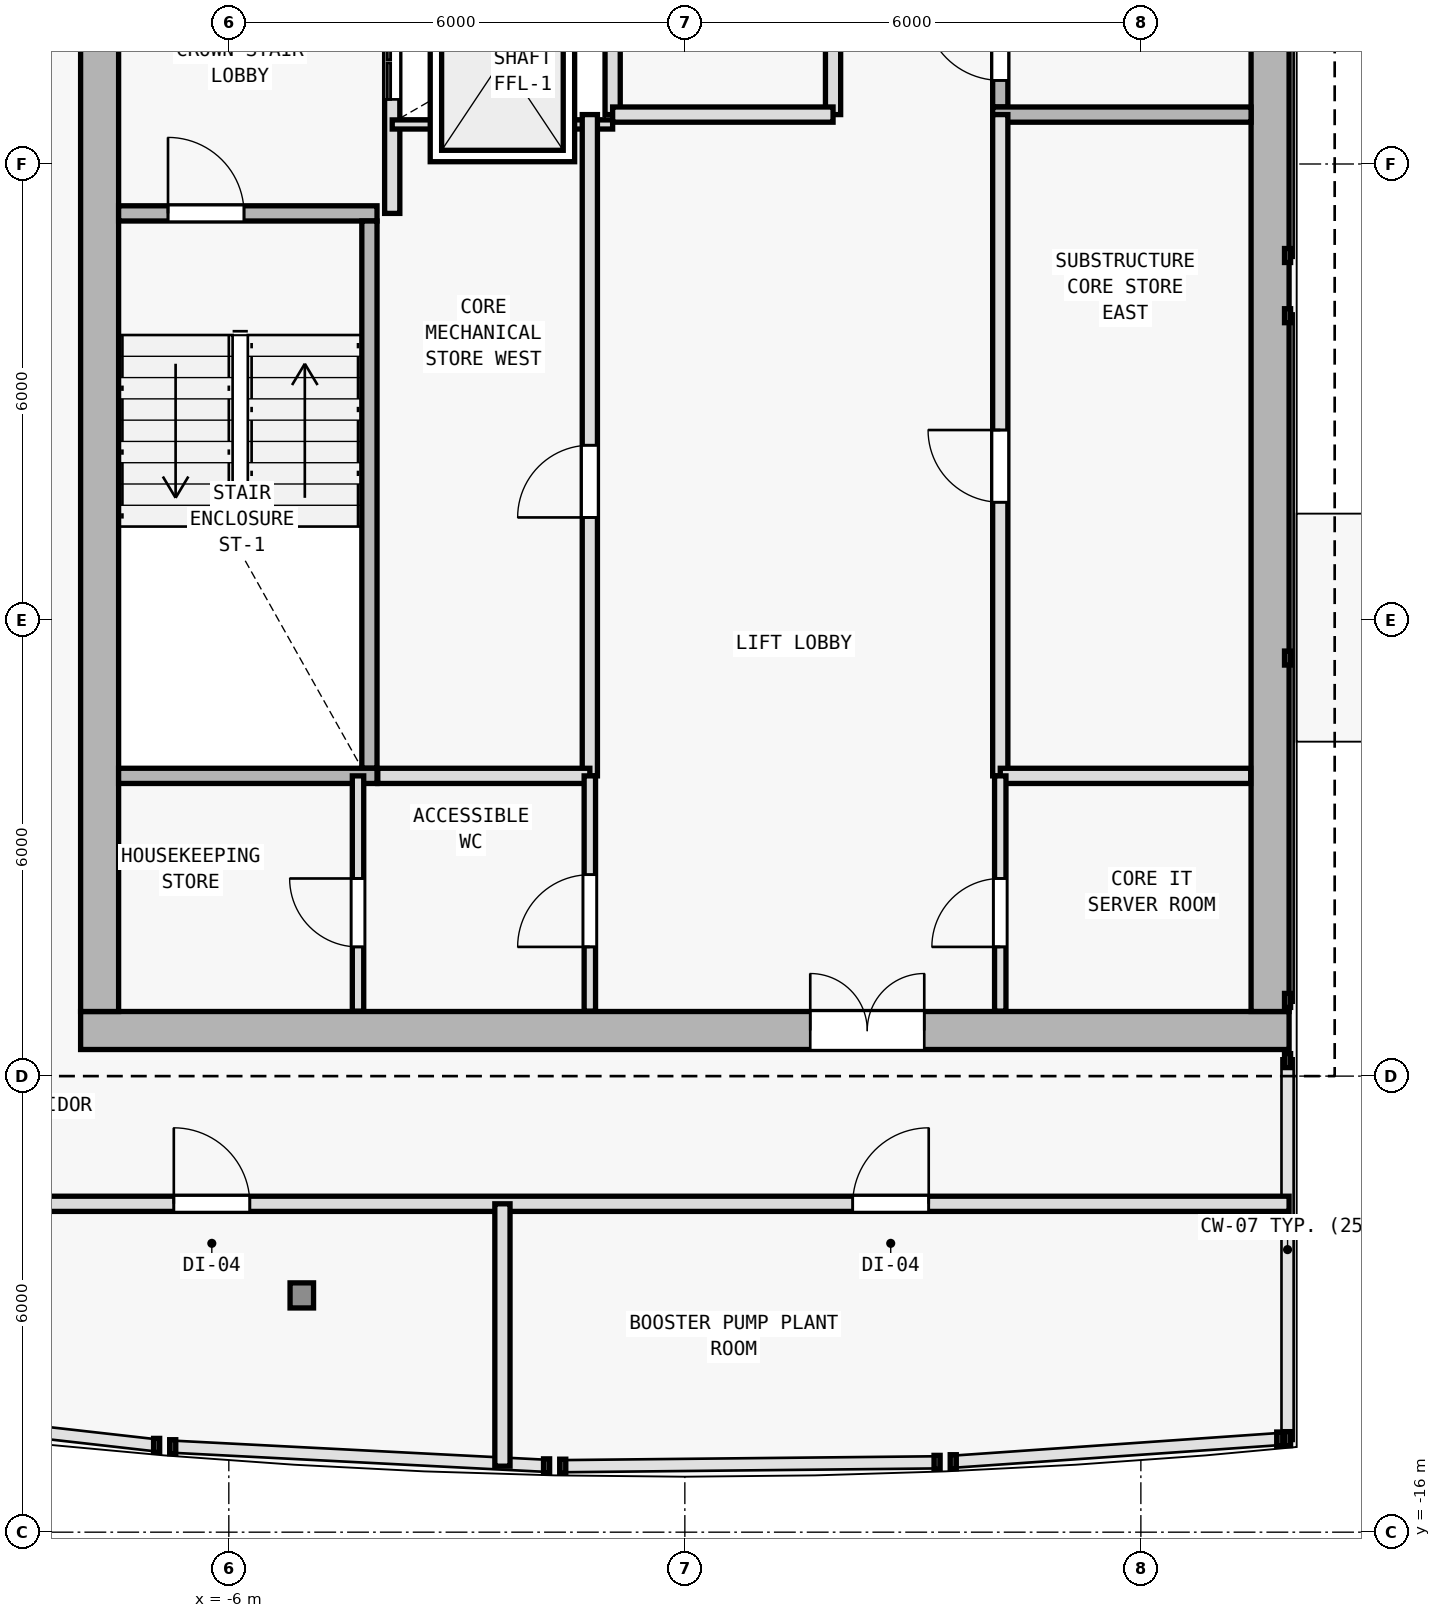
"""IFC4 building model, lengths in metres.
Left out: names, types, materials, properties, quantities, classifications, styles, units other than length and angle.
Written with IfcOpenShell. Run it as: python <this file> out.ifc"""

import sys

from ifc_helpers import new_model, si_unit, direction, frame, frame_2d, origin, origin_2d, place, context, subcontext, project, spatial, rectangle, i_section, extrude, element, fill, save


model = new_model("IFC4")
c1 = context("Model", 3, precision=1e-05, world=origin(), true_north=direction((0.0, 1.0)))
c2 = subcontext(c1, "Body", "Model", "MODEL_VIEW")
j1 = project(units=[si_unit("LENGTHUNIT", "METRE"), si_unit("PLANEANGLEUNIT", "RADIAN")], contexts=[c1])
p1 = place(None, origin())
s1 = spatial("IfcSite", under=j1, at=p1, CompositionType="ELEMENT")
p2 = place(p1, origin())
s2 = spatial("IfcBuilding", under=s1, at=p2, CompositionType="ELEMENT")
p3 = place(p2, frame((0.0, 0.0, 301.2)))
s3 = spatial("IfcBuildingStorey", under=s2, at=p3, CompositionType="ELEMENT", Elevation=301.2)
for number, where, z_axis, x_axis in (
    (1, (-7.7, -9.4, 0.0), (0.0, 0.0, 1.0), (1.0, 0.0, 0.0)),
    (2, (7.7, -9.4, 0.0), (0.0, 0.0, 1.0), (1.0, 0.0, 0.0)),
    (3, (0.0, -9.4, 0.0), (0.0, 0.0, 1.0), (1.0, 0.0, 0.0)),
    (4, (7.7, 0.4, 0.0), (0.0, 0.0, 1.0), (1.0, 0.0, 0.0)),
    (5, (-7.7, 2.0, 0.0), (0.0, 0.0, 1.0), (1.0, 0.0, 0.0)),
):
    element("IfcColumn", number, at=place(p3, frame(where, z_axis=z_axis, x_axis=x_axis)), inside=s3, PredefinedType="COLUMN", context=c2, shape_type="SweptSolid", body=[
        extrude(i_section(OverallWidth=0.374, OverallDepth=0.372, WebThickness=0.012, FlangeThickness=0.02, FilletRadius=0.015, at=origin_2d()), origin(), (0.0, 0.0, 1.0), 3.6),
    ])
p4 = place(p3, frame((-5.04, -12.885, 0.0), z_axis=(0.0, 0.0, 1.0), x_axis=(1.0, 0.0, 0.0)))
e6 = element("IfcColumn", 6, at=p4, inside=s3, PredefinedType="COLUMN", context=c2, shape_type="SweptSolid", body=[
    extrude(i_section(OverallWidth=0.309, OverallDepth=0.33, WebThickness=0.011, FlangeThickness=0.019, FilletRadius=0.027, at=origin_2d()), origin(), (0.0, 0.0, 1.0), 3.6),
])
p5 = place(p3, frame((-7.95, -9.4, 0.0), z_axis=(0.0, 0.0, 1.0), x_axis=(1.0, 0.0, 0.0)))
e7 = element("IfcWall", 7, at=p5, inside=s3, PredefinedType="SHEAR", context=c2, shape_type="SweptSolid", body=[
    extrude(rectangle(XDim=15.9, YDim=0.5, at=frame_2d((7.95, 0.0))), origin(), (0.0, 0.0, 1.0), 3.34),
])
p6 = place(p5, frame((9.6, 0.0, 0.0)))
e8 = element("IfcOpeningElement", 8, at=p6, cuts=e7, PredefinedType="OPENING", context=c2, shape_type="SweptSolid", body=[
    extrude(rectangle(XDim=1.5, YDim=2.2, at=frame_2d((0.75, 1.1))), frame((0.0, 0.26, 0.0), z_axis=(0.0, -1.0, 0.0), x_axis=(1.0, 0.0, 0.0)), (0.0, 0.0, 1.0), 0.52),
])
p7 = place(p3, frame((-7.7, -9.15, 0.0), z_axis=(0.0, 0.0, 1.0), x_axis=(0.0, 1.0, 0.0)))
e9 = element("IfcWall", 9, at=p7, inside=s3, PredefinedType="SHEAR", context=c2, shape_type="SweptSolid", body=[
    extrude(rectangle(XDim=19.1, YDim=0.5, at=frame_2d((9.55, 0.0))), origin(), (0.0, 0.0, 1.0), 3.34),
])
p8 = place(p7, frame((12.7, 0.0, 0.0)))
e10 = element("IfcOpeningElement", 10, at=p8, cuts=e9, PredefinedType="OPENING", context=c2, shape_type="SweptSolid", body=[
    extrude(rectangle(XDim=1.1, YDim=2.15, at=frame_2d((0.55, 1.075))), frame((0.0, 0.26, 0.0), z_axis=(0.0, -1.0, 0.0), x_axis=(1.0, 0.0, 0.0)), (0.0, 0.0, 1.0), 0.52),
])
p9 = place(p3, frame((7.7, 9.95, 0.0), z_axis=(0.0, 0.0, 1.0), x_axis=(0.0, -1.0, 0.0)))
e11 = element("IfcWall", 11, at=p9, inside=s3, PredefinedType="SHEAR", context=c2, shape_type="SweptSolid", body=[
    extrude(rectangle(XDim=19.1, YDim=0.5, at=frame_2d((9.55, 0.0))), origin(), (0.0, 0.0, 1.0), 3.34),
])
p10 = place(p3, frame((-7.45, 1.35, 0.0), z_axis=(0.0, 0.0, 1.0), x_axis=(1.0, 0.0, 0.0)))
e12 = element("IfcWall", 12, at=p10, inside=s3, PredefinedType="SOLIDWALL", context=c2, shape_type="SweptSolid", body=[
    extrude(rectangle(XDim=3.4, YDim=0.2, at=frame_2d((1.7, 0.0))), origin(), (0.0, 0.0, 1.0), 3.34),
])
p11 = place(p10, frame((0.65, 0.0, 0.0)))
e13 = element("IfcOpeningElement", 13, at=p11, cuts=e12, PredefinedType="OPENING", context=c2, shape_type="SweptSolid", body=[
    extrude(rectangle(XDim=1.0, YDim=2.15, at=frame_2d((0.5, 1.075))), frame((0.0, 0.11, 0.0), z_axis=(0.0, -1.0, 0.0), x_axis=(1.0, 0.0, 0.0)), (0.0, 0.0, 1.0), 0.22),
])
p12 = place(p3, frame((-4.15, -5.95, 0.0), z_axis=(0.0, 0.0, 1.0), x_axis=(0.0, 1.0, 0.0)))
e14 = element("IfcWall", 14, at=p12, inside=s3, PredefinedType="SOLIDWALL", context=c2, shape_type="SweptSolid", body=[
    extrude(rectangle(XDim=7.2, YDim=0.2, at=frame_2d((3.6, 0.0))), origin(), (0.0, 0.0, 1.0), 3.34),
])
p13 = place(p3, frame((-3.85, 1.35, 0.0), z_axis=(0.0, 0.0, 1.0), x_axis=(0.0, 1.0, 0.0)))
e15 = element("IfcWall", 15, at=p13, inside=s3, PredefinedType="SOLIDWALL", context=c2, shape_type="SweptSolid", body=[
    extrude(rectangle(XDim=8.595, YDim=0.2, at=frame_2d((4.297, 0.0))), origin(), (0.0, 0.0, 1.0), 3.34),
])
p14 = place(p13, frame((1.5, 0.0, 0.0)))
e16 = element("IfcOpeningElement", 16, at=p14, cuts=e15, PredefinedType="OPENING", context=c2, shape_type="SweptSolid", body=[
    extrude(rectangle(XDim=1.0, YDim=2.15, at=frame_2d((0.5, 1.075))), frame((0.0, 0.11, 0.0), z_axis=(0.0, -1.0, 0.0), x_axis=(1.0, 0.0, 0.0)), (0.0, 0.0, 1.0), 0.22),
])
p15 = place(p13, frame((3.18, 0.0, 0.0)))
e17 = element("IfcOpeningElement", 17, at=p15, cuts=e15, PredefinedType="OPENING", context=c2, shape_type="SweptSolid", body=[
    extrude(rectangle(XDim=1.0, YDim=2.15, at=frame_2d((0.5, 1.075))), frame((0.0, 0.11, 0.0), z_axis=(0.0, -1.0, 0.0), x_axis=(1.0, 0.0, 0.0)), (0.0, 0.0, 1.0), 0.22),
])
p16 = place(p3, frame((4.15, 2.75, 0.0), z_axis=(0.0, 0.0, 1.0), x_axis=(0.0, 1.0, 0.0)))
e18 = element("IfcWall", 18, at=p16, inside=s3, PredefinedType="SOLIDWALL", context=c2, shape_type="SweptSolid", body=[
    extrude(rectangle(XDim=7.2, YDim=0.2, at=frame_2d((3.6, 0.0))), origin(), (0.0, 0.0, 1.0), 3.34),
])
p17 = place(p16, frame((0.35, 0.0, 0.0)))
e19 = element("IfcOpeningElement", 19, at=p17, cuts=e18, PredefinedType="OPENING", context=c2, shape_type="SweptSolid", body=[
    extrude(rectangle(XDim=1.0, YDim=2.15, at=frame_2d((0.5, 1.075))), frame((0.0, 0.11, 0.0), z_axis=(0.0, -1.0, 0.0), x_axis=(1.0, 0.0, 0.0)), (0.0, 0.0, 1.0), 0.22),
])
p18 = place(p3, frame((4.05, 2.65, 0.0), z_axis=(0.0, 0.0, 1.0), x_axis=(1.0, 0.0, 0.0)))
e20 = element("IfcWall", 20, at=p18, inside=s3, PredefinedType="SOLIDWALL", context=c2, shape_type="SweptSolid", body=[
    extrude(rectangle(XDim=3.4, YDim=0.2, at=frame_2d((1.7, 0.0))), origin(), (0.0, 0.0, 1.0), 3.34),
])
p19 = place(p3, frame((-0.95, 2.65, 0.0), z_axis=(0.0, 0.0, 1.0), x_axis=(0.0, 1.0, 0.0)))
e21 = element("IfcWall", 21, at=p19, inside=s3, PredefinedType="SOLIDWALL", context=c2, shape_type="SweptSolid", body=[
    extrude(rectangle(XDim=3.27, YDim=0.2, at=frame_2d((1.635, 0.0))), origin(), (0.0, 0.0, 1.0), 3.34),
])
p20 = place(p3, frame((-3.85, 2.52, 0.0), z_axis=(0.0, 0.0, 1.0), x_axis=(1.0, 0.0, 0.0)))
e22 = element("IfcWall", 22, at=p20, inside=s3, PredefinedType="PARTITIONING", context=c2, shape_type="SweptSolid", body=[
    extrude(rectangle(XDim=2.9, YDim=0.12, at=frame_2d((1.45, 0.0))), origin(), (0.0, 0.0, 1.0), 3.34),
])
p21 = place(p3, frame((4.15, -6.05, 0.0), z_axis=(0.0, 0.0, 1.0), x_axis=(0.0, 1.0, 0.0)))
e23 = element("IfcWall", 23, at=p21, inside=s3, PredefinedType="SOLIDWALL", context=c2, shape_type="SweptSolid", body=[
    extrude(rectangle(XDim=8.7, YDim=0.2, at=frame_2d((4.35, 0.0))), origin(), (0.0, 0.0, 1.0), 3.34),
])
p22 = place(p21, frame((3.6, 0.0, 0.0)))
e24 = element("IfcOpeningElement", 24, at=p22, cuts=e23, PredefinedType="OPENING", context=c2, shape_type="SweptSolid", body=[
    extrude(rectangle(XDim=0.95, YDim=2.1, at=frame_2d((0.475, 1.05))), frame((0.0, 0.11, 0.0), z_axis=(0.0, -1.0, 0.0), x_axis=(1.0, 0.0, 0.0)), (0.0, 0.0, 1.0), 0.22),
])
p23 = place(p3, frame((-1.25, -6.05, 0.0), z_axis=(0.0, 0.0, 1.0), x_axis=(0.0, 1.0, 0.0)))
e25 = element("IfcWall", 25, at=p23, inside=s3, PredefinedType="SOLIDWALL", context=c2, shape_type="SweptSolid", body=[
    extrude(rectangle(XDim=8.7, YDim=0.2, at=frame_2d((4.35, 0.0))), origin(), (0.0, 0.0, 1.0), 3.34),
])
p24 = place(p23, frame((3.4, 0.0, 0.0)))
e26 = element("IfcOpeningElement", 26, at=p24, cuts=e25, PredefinedType="OPENING", context=c2, shape_type="SweptSolid", body=[
    extrude(rectangle(XDim=0.95, YDim=2.1, at=frame_2d((0.475, 1.05))), frame((0.0, 0.11, 0.0), z_axis=(0.0, -1.0, 0.0), x_axis=(1.0, 0.0, 0.0)), (0.0, 0.0, 1.0), 0.22),
])
p25 = place(p3, frame((1.95, 2.65, 0.0), z_axis=(0.0, 0.0, 1.0), x_axis=(0.0, 1.0, 0.0)))
e27 = element("IfcWall", 27, at=p25, inside=s3, PredefinedType="SOLIDWALL", context=c2, shape_type="SweptSolid", body=[
    extrude(rectangle(XDim=7.295, YDim=0.2, at=frame_2d((3.647, 0.0))), origin(), (0.0, 0.0, 1.0), 3.34),
])
p26 = place(p25, frame((2.4, 0.0, 0.0)))
e28 = element("IfcOpeningElement", 28, at=p26, cuts=e27, PredefinedType="OPENING", context=c2, shape_type="SweptSolid", body=[
    extrude(rectangle(XDim=0.95, YDim=2.1, at=frame_2d((0.475, 1.05))), frame((0.0, 0.11, 0.0), z_axis=(0.0, -1.0, 0.0), x_axis=(1.0, 0.0, 0.0)), (0.0, 0.0, 1.0), 0.22),
])
p27 = place(p3, frame((-0.95, 2.65, 0.0), z_axis=(0.0, 0.0, 1.0), x_axis=(1.0, 0.0, 0.0)))
e29 = element("IfcWall", 29, at=p27, inside=s3, PredefinedType="SOLIDWALL", context=c2, shape_type="SweptSolid", body=[
    extrude(rectangle(XDim=2.9, YDim=0.2, at=frame_2d((1.45, 0.0))), origin(), (0.0, 0.0, 1.0), 3.34),
])
p28 = place(p3, frame((-7.45, -6.05, 0.0), z_axis=(0.0, 0.0, 1.0), x_axis=(1.0, 0.0, 0.0)))
e30 = element("IfcWall", 30, at=p28, inside=s3, PredefinedType="SOLIDWALL", context=c2, shape_type="SweptSolid", body=[
    extrude(rectangle(XDim=3.4, YDim=0.2, at=frame_2d((1.7, 0.0))), origin(), (0.0, 0.0, 1.0), 3.34),
])
p29 = place(p3, frame((-4.04, -6.05, 0.0), z_axis=(0.0, 0.0, 1.0), x_axis=(1.0, 0.0, 0.0)))
e31 = element("IfcWall", 31, at=p29, inside=s3, PredefinedType="SOLIDWALL", context=c2, shape_type="SweptSolid", body=[
    extrude(rectangle(XDim=2.79, YDim=0.2, at=frame_2d((1.395, 0.0))), origin(), (0.0, 0.0, 1.0), 3.34),
])
p30 = place(p3, frame((4.15, -6.05, 0.0), z_axis=(0.0, 0.0, 1.0), x_axis=(1.0, 0.0, 0.0)))
e32 = element("IfcWall", 32, at=p30, inside=s3, PredefinedType="SOLIDWALL", context=c2, shape_type="SweptSolid", body=[
    extrude(rectangle(XDim=3.295, YDim=0.2, at=frame_2d((1.647, 0.0))), origin(), (0.0, 0.0, 1.0), 3.34),
])
p31 = place(p3, frame((-1.25, -9.145, 0.0), z_axis=(0.0, 0.0, 1.0), x_axis=(0.0, 1.0, 0.0)))
e33 = element("IfcWall", 33, at=p31, inside=s3, PredefinedType="PARTITIONING", context=c2, shape_type="SweptSolid", body=[
    extrude(rectangle(XDim=3.095, YDim=0.15, at=frame_2d((1.547, 0.0))), origin(), (0.0, 0.0, 1.0), 3.34),
])
p32 = place(p31, frame((0.845, 0.0, 0.0)))
e34 = element("IfcOpeningElement", 34, at=p32, cuts=e33, PredefinedType="OPENING", context=c2, shape_type="SweptSolid", body=[
    extrude(rectangle(XDim=0.95, YDim=2.1, at=frame_2d((0.475, 1.05))), frame((0.0, 0.085, 0.0), z_axis=(0.0, -1.0, 0.0), x_axis=(1.0, 0.0, 0.0)), (0.0, 0.0, 1.0), 0.17),
])
p33 = place(p3, frame((4.15, -9.145, 0.0), z_axis=(0.0, 0.0, 1.0), x_axis=(0.0, 1.0, 0.0)))
e35 = element("IfcWall", 35, at=p33, inside=s3, PredefinedType="PARTITIONING", context=c2, shape_type="SweptSolid", body=[
    extrude(rectangle(XDim=3.095, YDim=0.15, at=frame_2d((1.547, 0.0))), origin(), (0.0, 0.0, 1.0), 3.34),
])
p34 = place(p33, frame((0.845, 0.0, 0.0)))
e36 = element("IfcOpeningElement", 36, at=p34, cuts=e35, PredefinedType="OPENING", context=c2, shape_type="SweptSolid", body=[
    extrude(rectangle(XDim=0.9, YDim=2.1, at=frame_2d((0.45, 1.05))), frame((0.0, 0.085, 0.0), z_axis=(0.0, -1.0, 0.0), x_axis=(1.0, 0.0, 0.0)), (0.0, 0.0, 1.0), 0.17),
])
p35 = place(p3, frame((-4.3, -9.145, 0.0), z_axis=(0.0, 0.0, 1.0), x_axis=(0.0, 1.0, 0.0)))
e37 = element("IfcWall", 37, at=p35, inside=s3, PredefinedType="PARTITIONING", context=c2, shape_type="SweptSolid", body=[
    extrude(rectangle(XDim=3.095, YDim=0.15, at=frame_2d((1.547, 0.0))), origin(), (0.0, 0.0, 1.0), 3.34),
])
p36 = place(p35, frame((0.845, 0.0, 0.0)))
e38 = element("IfcOpeningElement", 38, at=p36, cuts=e37, PredefinedType="OPENING", context=c2, shape_type="SweptSolid", body=[
    extrude(rectangle(XDim=0.9, YDim=2.1, at=frame_2d((0.45, 1.05))), frame((0.0, 0.085, 0.0), z_axis=(0.0, -1.0, 0.0), x_axis=(1.0, 0.0, 0.0)), (0.0, 0.0, 1.0), 0.17),
])
p37 = place(p3, frame((-10.18, -11.68, 0.0), z_axis=(0.0, 0.0, 1.0), x_axis=(1.0, 0.0, 0.0)))
e39 = element("IfcWall", 39, at=p37, inside=s3, PredefinedType="SOLIDWALL", context=c2, shape_type="SweptSolid", body=[
    extrude(rectangle(XDim=18.13, YDim=0.2, at=frame_2d((9.065, 0.0))), origin(), (0.0, 0.0, 1.0), 2.995),
])
p38 = place(p37, frame((3.456, 0.0, 0.0)))
e40 = element("IfcOpeningElement", 40, at=p38, cuts=e39, PredefinedType="OPENING", context=c2, shape_type="SweptSolid", body=[
    extrude(rectangle(XDim=1.0, YDim=2.15, at=frame_2d((0.5, 1.075))), frame((0.0, 0.11, 0.0), z_axis=(0.0, -1.0, 0.0), x_axis=(1.0, 0.0, 0.0)), (0.0, 0.0, 1.0), 0.22),
])
p39 = place(p37, frame((12.389, 0.0, 0.0)))
e41 = element("IfcOpeningElement", 41, at=p39, cuts=e39, PredefinedType="OPENING", context=c2, shape_type="SweptSolid", body=[
    extrude(rectangle(XDim=1.0, YDim=2.15, at=frame_2d((0.5, 1.075))), frame((0.0, 0.11, 0.0), z_axis=(0.0, -1.0, 0.0), x_axis=(1.0, 0.0, 0.0)), (0.0, 0.0, 1.0), 0.22),
])
p40 = place(p3, frame((-2.4, -15.132, 0.0), z_axis=(0.0, 0.0, 1.0), x_axis=(0.0, 1.0, 0.0)))
e42 = element("IfcWall", 42, at=p40, inside=s3, PredefinedType="SOLIDWALL", context=c2, shape_type="SweptSolid", body=[
    extrude(rectangle(XDim=3.452, YDim=0.2, at=frame_2d((1.726, 0.0))), origin(), (0.0, 0.0, 1.0), 3.34),
])
p41 = place(p6, origin())
e43 = element("IfcDoor", 43, at=p41, inside=s3, OperationType="DOUBLE_DOOR_SINGLE_SWING", PredefinedType="DOOR", context=c2, shape_type="SweptSolid", body=[
    extrude(rectangle(XDim=1.5, YDim=2.2, at=frame_2d((0.75, 1.1))), frame((0.0, 0.025, 0.0), z_axis=(0.0, -1.0, 0.0), x_axis=(1.0, 0.0, 0.0)), (0.0, 0.0, 1.0), 0.05),
])
fill(e8, e43)
p42 = place(p11, origin())
e44 = element("IfcDoor", 44, at=p42, inside=s3, OperationType="SINGLE_SWING_LEFT", PredefinedType="DOOR", context=c2, shape_type="SweptSolid", body=[
    extrude(rectangle(XDim=1.0, YDim=2.15, at=frame_2d((0.5, 1.075))), frame((0.0, 0.025, 0.0), z_axis=(0.0, -1.0, 0.0), x_axis=(1.0, 0.0, 0.0)), (0.0, 0.0, 1.0), 0.05),
])
fill(e13, e44)
p43 = place(p17, origin())
e45 = element("IfcDoor", 45, at=p43, inside=s3, OperationType="SINGLE_SWING_RIGHT", PredefinedType="DOOR", context=c2, shape_type="SweptSolid", body=[
    extrude(rectangle(XDim=1.0, YDim=2.15, at=frame_2d((0.5, 1.075))), frame((0.0, 0.025, 0.0), z_axis=(0.0, -1.0, 0.0), x_axis=(1.0, 0.0, 0.0)), (0.0, 0.0, 1.0), 0.05),
])
fill(e19, e45)
p44 = place(p22, origin())
e46 = element("IfcDoor", 46, at=p44, inside=s3, OperationType="SINGLE_SWING_RIGHT", PredefinedType="DOOR", context=c2, shape_type="SweptSolid", body=[
    extrude(rectangle(XDim=0.95, YDim=2.1, at=frame_2d((0.475, 1.05))), frame((0.0, 0.025, 0.0), z_axis=(0.0, -1.0, 0.0), x_axis=(1.0, 0.0, 0.0)), (0.0, 0.0, 1.0), 0.05),
])
fill(e24, e46)
p45 = place(p24, origin())
e47 = element("IfcDoor", 47, at=p45, inside=s3, OperationType="SINGLE_SWING_LEFT", PredefinedType="DOOR", context=c2, shape_type="SweptSolid", body=[
    extrude(rectangle(XDim=0.95, YDim=2.1, at=frame_2d((0.475, 1.05))), frame((0.0, 0.025, 0.0), z_axis=(0.0, -1.0, 0.0), x_axis=(1.0, 0.0, 0.0)), (0.0, 0.0, 1.0), 0.05),
])
fill(e26, e47)
p46 = place(p14, origin())
e48 = element("IfcDoor", 48, at=p46, inside=s3, OperationType="DOUBLE_DOOR_SLIDING", PredefinedType="DOOR", context=c2, shape_type="SweptSolid", body=[
    extrude(rectangle(XDim=1.0, YDim=2.15, at=frame_2d((0.5, 1.075))), frame((0.0, 0.025, 0.0), z_axis=(0.0, -1.0, 0.0), x_axis=(1.0, 0.0, 0.0)), (0.0, 0.0, 1.0), 0.05),
])
fill(e16, e48)
p47 = place(p32, origin())
e49 = element("IfcDoor", 49, at=p47, inside=s3, OperationType="SINGLE_SWING_LEFT", PredefinedType="DOOR", context=c2, shape_type="SweptSolid", body=[
    extrude(rectangle(XDim=0.95, YDim=2.1, at=frame_2d((0.475, 1.05))), frame((0.0, 0.025, 0.0), z_axis=(0.0, -1.0, 0.0), x_axis=(1.0, 0.0, 0.0)), (0.0, 0.0, 1.0), 0.05),
])
fill(e34, e49)
p48 = place(p36, origin())
e50 = element("IfcDoor", 50, at=p48, inside=s3, OperationType="SINGLE_SWING_RIGHT", PredefinedType="DOOR", context=c2, shape_type="SweptSolid", body=[
    extrude(rectangle(XDim=0.9, YDim=2.1, at=frame_2d((0.45, 1.05))), frame((0.0, 0.025, 0.0), z_axis=(0.0, -1.0, 0.0), x_axis=(1.0, 0.0, 0.0)), (0.0, 0.0, 1.0), 0.05),
])
fill(e38, e50)
p49 = place(p34, origin())
e51 = element("IfcDoor", 51, at=p49, inside=s3, OperationType="SINGLE_SWING_LEFT", PredefinedType="DOOR", context=c2, shape_type="SweptSolid", body=[
    extrude(rectangle(XDim=0.9, YDim=2.1, at=frame_2d((0.45, 1.05))), frame((0.0, 0.025, 0.0), z_axis=(0.0, -1.0, 0.0), x_axis=(1.0, 0.0, 0.0)), (0.0, 0.0, 1.0), 0.05),
])
fill(e36, e51)
p50 = place(p38, origin())
e52 = element("IfcDoor", 52, at=p50, inside=s3, OperationType="SINGLE_SWING_LEFT", PredefinedType="DOOR", context=c2, shape_type="SweptSolid", body=[
    extrude(rectangle(XDim=1.0, YDim=2.15, at=frame_2d((0.5, 1.075))), frame((0.0, 0.025, 0.0), z_axis=(0.0, -1.0, 0.0), x_axis=(1.0, 0.0, 0.0)), (0.0, 0.0, 1.0), 0.05),
])
fill(e40, e52)
p51 = place(p39, origin())
e53 = element("IfcDoor", 53, at=p51, inside=s3, OperationType="SINGLE_SWING_RIGHT", PredefinedType="DOOR", context=c2, shape_type="SweptSolid", body=[
    extrude(rectangle(XDim=1.0, YDim=2.15, at=frame_2d((0.5, 1.075))), frame((0.0, 0.025, 0.0), z_axis=(0.0, -1.0, 0.0), x_axis=(1.0, 0.0, 0.0)), (0.0, 0.0, 1.0), 0.05),
])
fill(e41, e53)
save(model, sys.argv[1])
